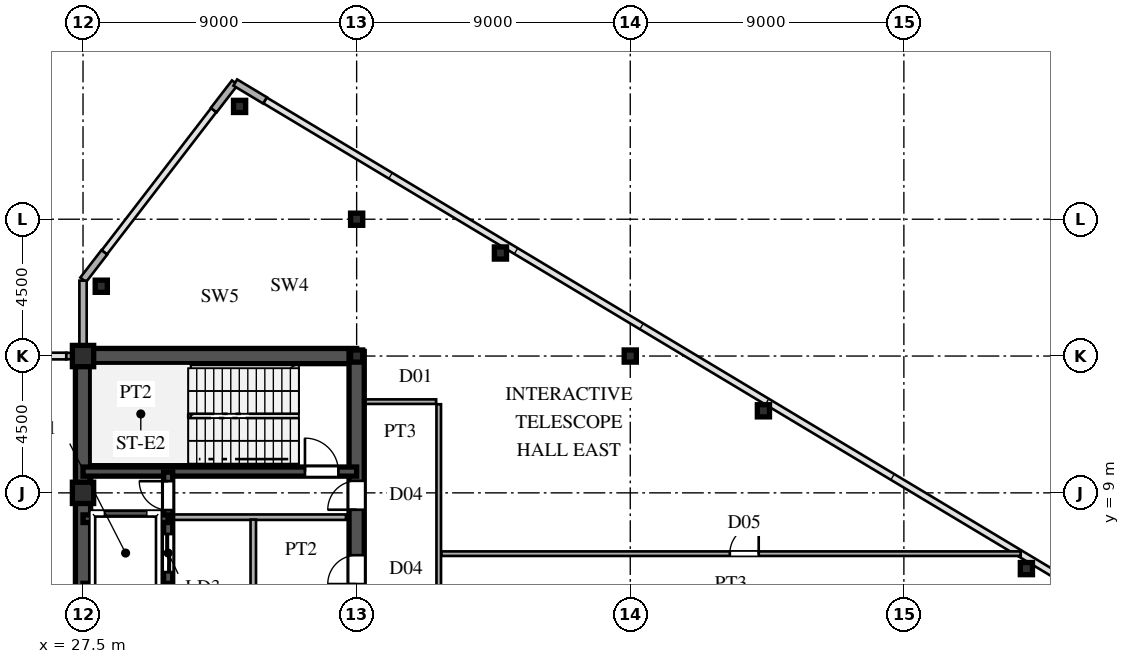
"""IFC4 building model, lengths in metres.
Left out: names, types, materials, properties, quantities, classifications, styles, units other than length and angle.
Written with IfcOpenShell. Run it as: python <this file> out.ifc"""

import sys

from ifc_helpers import new_model, si_unit, direction, frame, frame_2d, origin, origin_2d, place, context, subcontext, project, spatial, rectangle, hollow_rectangle, i_section, extrude, source, transform, mapped, element, fill, save


model = new_model("IFC4")
c1 = context("Model", 3, precision=1e-05, world=origin(), true_north=direction((0.0, 1.0)))
c2 = subcontext(c1, "Body", "Model", "MODEL_VIEW")
j1 = project(units=[si_unit("LENGTHUNIT", "METRE"), si_unit("PLANEANGLEUNIT", "RADIAN")], contexts=[c1])
p1 = place(None, origin())
s1 = spatial("IfcSite", under=j1, at=p1, CompositionType="ELEMENT")
p2 = place(p1, origin())
s2 = spatial("IfcBuilding", under=s1, at=p2, CompositionType="ELEMENT")
p3 = place(p2, frame((0.0, 0.0, 269.4)))
s3 = spatial("IfcBuildingStorey", under=s2, at=p3, CompositionType="ELEMENT", Elevation=269.4)
m1 = source(origin(), c2, "Body", "SweptSolid", [
    extrude(hollow_rectangle(XDim=0.7, YDim=0.7, WallThickness=0.03, at=origin_2d()), origin(), (0.0, 0.0, 1.0), 4.8),
])
for number, where, z_axis, x_axis in (
    (1, (27.5, 9.0, 0.0), (0.0, 0.0, 1.0), (1.0, 0.0, 0.0)),
    (2, (27.5, 13.5, 0.0), (0.0, 0.0, 1.0), (1.0, 0.0, 0.0)),
):
    element("IfcColumn", number, at=place(p3, frame(where, z_axis=z_axis, x_axis=x_axis)), inside=s3, PredefinedType="COLUMN", context=c2, shape_type="MappedRepresentation", body=[
        mapped(m1, transform((0.0, 0.0, 0.0), scale=1.0)),
    ])
m2 = source(origin(), c2, "Body", "SweptSolid", [
    extrude(i_section(OverallWidth=0.4, OverallDepth=0.4, WebThickness=0.013, FlangeThickness=0.021, at=origin_2d()), origin(), (0.0, 0.0, 1.0), 4.8),
])
for number, where, z_axis, x_axis in (
    (3, (36.5, 13.5, 0.0), (0.0, 0.0, 1.0), (1.0, 0.0, 0.0)),
    (4, (36.5, 18.0, 0.0), (0.0, 0.0, 1.0), (1.0, 0.0, 0.0)),
    (5, (45.5, 13.5, 0.0), (0.0, 0.0, 1.0), (1.0, 0.0, 0.0)),
):
    element("IfcColumn", number, at=place(p3, frame(where, z_axis=z_axis, x_axis=x_axis)), inside=s3, PredefinedType="COLUMN", context=c2, shape_type="MappedRepresentation", body=[
        mapped(m2, transform((0.0, 0.0, 0.0), scale=1.0)),
    ])
m3 = source(origin(), c2, "Body", "SweptSolid", [
    extrude(hollow_rectangle(XDim=0.4, YDim=0.4, WallThickness=0.016, at=origin_2d()), origin(), (0.0, 0.0, 1.0), 4.8),
])
for number, where, z_axis, x_axis in (
    (6, (32.65, 21.71, 0.0), (0.0, 0.0, 1.0), (1.0, 0.0, 0.0)),
    (7, (28.1, 15.796, 0.0), (0.0, 0.0, 1.0), (1.0, 0.0, 0.0)),
    (8, (41.23, 16.889, 0.0), (0.0, 0.0, 1.0), (1.0, 0.0, 0.0)),
    (9, (49.88, 11.699, 0.0), (0.0, 0.0, 1.0), (1.0, 0.0, 0.0)),
    (10, (58.53, 6.509, 0.0), (0.0, 0.0, 1.0), (1.0, 0.0, 0.0)),
):
    element("IfcColumn", number, at=place(p3, frame(where, z_axis=z_axis, x_axis=x_axis)), inside=s3, PredefinedType="COLUMN", context=c2, shape_type="MappedRepresentation", body=[
        mapped(m3, transform((0.0, 0.0, 0.0), scale=1.0)),
    ])
for number, where, z_axis, x_axis in (
    (11, (33.486, 21.908, 0.0), (0.0, 0.0, 1.0), (-0.857, 0.515, 0.0)),
    (12, (32.494, 22.492, 0.0), (0.0, 0.0, 1.0), (-0.61, -0.793, 0.0)),
    (13, (28.201, 16.912, 0.0), (0.0, 0.0, 1.0), (-0.61, -0.793, 0.0)),
):
    element("IfcWall", number, at=place(p3, frame(where, z_axis=z_axis, x_axis=x_axis)), inside=s3, PredefinedType="SOLIDWALL", context=c2, shape_type="SweptSolid", body=[
        extrude(rectangle(XDim=1.14, YDim=0.24, at=frame_2d((0.57, 0.0))), origin(), (0.0, 0.0, 1.0), 4.54),
    ])
p4 = place(p3, frame((27.5, 13.755, 0.0), z_axis=(0.0, 0.0, 1.0), x_axis=(0.0, 1.0, 0.0)))
e14 = element("IfcWall", 14, at=p4, inside=s3, PredefinedType="SOLIDWALL", context=c2, shape_type="SweptSolid", body=[
    extrude(rectangle(XDim=0.62, YDim=0.24, at=frame_2d((0.31, 0.0))), origin(), (0.0, 0.0, 1.0), 4.04),
])
p5 = place(p3, frame((27.5, 14.375, 0.0), z_axis=(0.0, 0.0, 1.0), x_axis=(0.0, 1.0, 0.0)))
e15 = element("IfcWall", 15, at=p5, inside=s3, PredefinedType="SOLIDWALL", context=c2, shape_type="SweptSolid", body=[
    extrude(rectangle(XDim=1.605, YDim=0.24, at=frame_2d((0.803, 0.0))), origin(), (0.0, 0.0, 1.0), 4.54),
])
p6 = place(p3, frame((26.95, 13.5, 0.0), z_axis=(0.0, 0.0, 1.0), x_axis=(1.0, 0.0, 0.0)))
e16 = element("IfcWall", 16, at=p6, inside=s3, PredefinedType="SOLIDWALL", context=c2, shape_type="SweptSolid", body=[
    extrude(rectangle(XDim=0.54, YDim=0.21, at=frame_2d((0.27, 0.0))), origin(), (0.0, 0.0, 1.0), 4.04),
])
p7 = place(p3, frame((27.5, 1.3, 0.0), z_axis=(0.0, 0.0, 1.0), x_axis=(0.0, 1.0, 0.0)))
e17 = element("IfcWall", 17, at=p7, inside=s3, PredefinedType="SHEAR", context=c2, shape_type="SweptSolid", body=[
    extrude(rectangle(XDim=12.2, YDim=0.5, at=frame_2d((6.1, 0.0))), origin(), (0.0, 0.0, 1.0), 4.54),
])
p8 = place(p3, frame((27.5, 13.5, 0.0), z_axis=(0.0, 0.0, 1.0), x_axis=(1.0, 0.0, 0.0)))
e18 = element("IfcWall", 18, at=p8, inside=s3, PredefinedType="SHEAR", context=c2, shape_type="SweptSolid", body=[
    extrude(rectangle(XDim=9.0, YDim=0.5, at=frame_2d((4.5, 0.0))), origin(), (0.0, 0.0, 1.0), 4.54),
])
p9 = place(p3, frame((36.5, 8.2, 0.0), z_axis=(0.0, 0.0, 1.0), x_axis=(0.0, 1.0, 0.0)))
e19 = element("IfcWall", 19, at=p9, inside=s3, PredefinedType="SHEAR", context=c2, shape_type="SweptSolid", body=[
    extrude(rectangle(XDim=5.45, YDim=0.5, at=frame_2d((2.725, 0.0))), origin(), (0.0, 0.0, 1.0), 4.54),
])
p10 = place(p9, frame((0.245, 0.0, 0.0)))
e20 = element("IfcOpeningElement", 20, at=p10, cuts=e19, PredefinedType="OPENING", context=c2, shape_type="SweptSolid", body=[
    extrude(rectangle(XDim=0.95, YDim=2.15, at=frame_2d((0.475, 1.075))), frame((0.0, 0.26, 0.0), z_axis=(0.0, -1.0, 0.0), x_axis=(1.0, 0.0, 0.0)), (0.0, 0.0, 1.0), 0.52),
])
p11 = place(p3, frame((36.5, 4.75, 0.0), z_axis=(0.0, 0.0, 1.0), x_axis=(0.0, 1.0, 0.0)))
e21 = element("IfcWall", 21, at=p11, inside=s3, PredefinedType="SHEAR", context=c2, shape_type="SweptSolid", body=[
    extrude(rectangle(XDim=3.45, YDim=0.5, at=frame_2d((1.725, 0.0))), origin(), (0.0, 0.0, 1.0), 4.54),
])
p12 = place(p11, frame((1.25, 0.0, 0.0)))
e22 = element("IfcOpeningElement", 22, at=p12, cuts=e21, PredefinedType="OPENING", context=c2, shape_type="SweptSolid", body=[
    extrude(rectangle(XDim=0.95, YDim=2.15, at=frame_2d((0.475, 1.075))), frame((0.0, 0.26, 0.0), z_axis=(0.0, -1.0, 0.0), x_axis=(1.0, 0.0, 0.0)), (0.0, 0.0, 1.0), 0.52),
])
p13 = place(p3, frame((27.5, 9.7, 0.0), z_axis=(0.0, 0.0, 1.0), x_axis=(1.0, 0.0, 0.0)))
e23 = element("IfcWall", 23, at=p13, inside=s3, PredefinedType="SHEAR", context=c2, shape_type="SweptSolid", body=[
    extrude(rectangle(XDim=9.0, YDim=0.3, at=frame_2d((4.5, 0.0))), origin(), (0.0, 0.0, 1.0), 4.54),
])
p14 = place(p13, frame((7.3, 0.0, 0.0)))
e24 = element("IfcOpeningElement", 24, at=p14, cuts=e23, PredefinedType="OPENING", context=c2, shape_type="SweptSolid", body=[
    extrude(rectangle(XDim=1.1, YDim=2.2, at=frame_2d((0.55, 1.1))), frame((0.0, 0.16, 0.0), z_axis=(0.0, -1.0, 0.0), x_axis=(1.0, 0.0, 0.0)), (0.0, 0.0, 1.0), 0.32),
])
for number, where, z_axis, x_axis in (
    (25, (27.5, 5.9, 0.0), (0.0, 0.0, 1.0), (1.0, 0.0, 0.0)),
    (26, (27.5, 8.15, 0.0), (0.0, 0.0, 1.0), (1.0, 0.0, 0.0)),
):
    element("IfcWall", number, at=place(p3, frame(where, z_axis=z_axis, x_axis=x_axis)), inside=s3, PredefinedType="SHEAR", context=c2, shape_type="SweptSolid", body=[
        extrude(rectangle(XDim=2.8, YDim=0.25, at=frame_2d((1.4, 0.0))), origin(), (0.0, 0.0, 1.0), 4.54),
    ])
p15 = place(p3, frame((30.3, 5.9, 0.0), z_axis=(0.0, 0.0, 1.0), x_axis=(0.0, 1.0, 0.0)))
e27 = element("IfcWall", 27, at=p15, inside=s3, PredefinedType="SHEAR", context=c2, shape_type="SweptSolid", body=[
    extrude(rectangle(XDim=2.25, YDim=0.3, at=frame_2d((1.125, 0.0))), origin(), (0.0, 0.0, 1.0), 4.54),
])
p16 = place(p15, frame((0.495, 0.0, 0.0)))
e28 = element("IfcOpeningElement", 28, at=p16, cuts=e27, PredefinedType="OPENING", context=c2, shape_type="SweptSolid", body=[
    extrude(rectangle(XDim=1.25, YDim=2.3, at=frame_2d((0.625, 1.15))), frame((0.0, 0.16, 0.0), z_axis=(0.0, -1.0, 0.0), x_axis=(1.0, 0.0, 0.0)), (0.0, 0.0, 1.0), 0.32),
])
p17 = place(p3, frame((30.3, 8.15, 0.0), z_axis=(0.0, 0.0, 1.0), x_axis=(0.0, 1.0, 0.0)))
e29 = element("IfcWall", 29, at=p17, inside=s3, PredefinedType="SHEAR", context=c2, shape_type="SweptSolid", body=[
    extrude(rectangle(XDim=1.53, YDim=0.3, at=frame_2d((0.765, 0.0))), origin(), (0.0, 0.0, 1.0), 4.54),
])
p18 = place(p17, frame((0.285, 0.0, 0.0)))
e30 = element("IfcOpeningElement", 30, at=p18, cuts=e29, PredefinedType="OPENING", context=c2, shape_type="SweptSolid", body=[
    extrude(rectangle(XDim=0.95, YDim=2.15, at=frame_2d((0.475, 1.075))), frame((0.0, 0.16, 0.0), z_axis=(0.0, -1.0, 0.0), x_axis=(1.0, 0.0, 0.0)), (0.0, 0.0, 1.0), 0.32),
])
p19 = place(p3, frame((30.45, 8.2, 0.0), z_axis=(0.0, 0.0, 1.0), x_axis=(1.0, 0.0, 0.0)))
e31 = element("IfcWall", 31, at=p19, inside=s3, PredefinedType="PARTITIONING", context=c2, shape_type="SweptSolid", body=[
    extrude(rectangle(XDim=5.7, YDim=0.18, at=frame_2d((2.85, 0.0))), origin(), (0.0, 0.0, 1.0), 4.54),
])
p20 = place(p3, frame((33.1, 1.38, 0.0), z_axis=(0.0, 0.0, 1.0), x_axis=(0.0, 1.0, 0.0)))
e32 = element("IfcWall", 32, at=p20, inside=s3, PredefinedType="PARTITIONING", context=c2, shape_type="SweptSolid", body=[
    extrude(rectangle(XDim=6.74, YDim=0.18, at=frame_2d((3.37, 0.0))), origin(), (0.0, 0.0, 1.0), 4.54),
])
p21 = place(p3, frame((39.285, 7.0, 0.0), z_axis=(0.0, 0.0, 1.0), x_axis=(1.0, 0.0, 0.0)))
e33 = element("IfcWall", 33, at=p21, inside=s3, PredefinedType="PARTITIONING", context=c2, shape_type="SweptSolid", body=[
    extrude(rectangle(XDim=19.058, YDim=0.15, at=frame_2d((9.529, 0.0))), origin(), (0.0, 0.0, 1.0), 4.54),
])
p22 = place(p21, frame((9.49, 0.0, 0.0)))
e34 = element("IfcOpeningElement", 34, at=p22, cuts=e33, PredefinedType="OPENING", context=c2, shape_type="SweptSolid", body=[
    extrude(rectangle(XDim=0.95, YDim=2.15, at=frame_2d((0.475, 1.075))), frame((0.0, 0.085, 0.0), z_axis=(0.0, -1.0, 0.0), x_axis=(1.0, 0.0, 0.0)), (0.0, 0.0, 1.0), 0.17),
])
p23 = place(p3, frame((36.755, 12.0, 0.0), z_axis=(0.0, 0.0, 1.0), x_axis=(1.0, 0.0, 0.0)))
e35 = element("IfcWall", 35, at=p23, inside=s3, PredefinedType="PARTITIONING", context=c2, shape_type="SweptSolid", body=[
    extrude(rectangle(XDim=2.36, YDim=0.15, at=frame_2d((1.18, 0.0))), origin(), (0.0, 0.0, 1.0), 4.54),
])
p24 = place(p3, frame((39.2, -11.915, 0.0), z_axis=(0.0, 0.0, 1.0), x_axis=(0.0, 1.0, 0.0)))
e36 = element("IfcWall", 36, at=p24, inside=s3, PredefinedType="PARTITIONING", context=c2, shape_type="SweptSolid", body=[
    extrude(rectangle(XDim=23.83, YDim=0.15, at=frame_2d((11.915, 0.0))), origin(), (0.0, 0.0, 1.0), 4.54),
])
p25 = place(p24, frame((11.44, 0.0, 0.0)))
e37 = element("IfcOpeningElement", 37, at=p25, cuts=e36, PredefinedType="OPENING", context=c2, shape_type="SweptSolid", body=[
    extrude(rectangle(XDim=0.95, YDim=2.15, at=frame_2d((0.475, 1.075))), frame((0.0, 0.085, 0.0), z_axis=(0.0, -1.0, 0.0), x_axis=(1.0, 0.0, 0.0)), (0.0, 0.0, 1.0), 0.17),
])
m4 = source(origin(), c2, "Body", "SweptSolid", [
    extrude(rectangle(XDim=0.95, YDim=2.15, at=frame_2d((0.475, 1.075))), frame((0.0, 0.025, 0.0), z_axis=(0.0, -1.0, 0.0), x_axis=(1.0, 0.0, 0.0)), (0.0, 0.0, 1.0), 0.05),
])
p26 = place(p10, origin())
e38 = element("IfcDoor", 38, at=p26, inside=s3, OperationType="SINGLE_SWING_LEFT", PredefinedType="DOOR", context=c2, shape_type="MappedRepresentation", body=[
    mapped(m4, transform((0.0, 0.0, 0.0), scale=1.0)),
])
fill(e20, e38)
p27 = place(p12, origin())
e39 = element("IfcDoor", 39, at=p27, inside=s3, OperationType="SINGLE_SWING_LEFT", PredefinedType="DOOR", context=c2, shape_type="MappedRepresentation", body=[
    mapped(m4, transform((0.0, 0.0, 0.0), scale=1.0)),
])
fill(e22, e39)
m5 = source(origin(), c2, "Body", "SweptSolid", [
    extrude(rectangle(XDim=1.1, YDim=2.2, at=frame_2d((0.55, 1.1))), frame((0.0, 0.025, 0.0), z_axis=(0.0, -1.0, 0.0), x_axis=(1.0, 0.0, 0.0)), (0.0, 0.0, 1.0), 0.05),
])
p28 = place(p14, origin())
e40 = element("IfcDoor", 40, at=p28, inside=s3, OperationType="SINGLE_SWING_LEFT", PredefinedType="DOOR", context=c2, shape_type="MappedRepresentation", body=[
    mapped(m5, transform((0.0, 0.0, 0.0), scale=1.0)),
])
fill(e24, e40)
m6 = source(origin(), c2, "Body", "SweptSolid", [
    extrude(rectangle(XDim=1.25, YDim=2.3, at=frame_2d((0.625, 1.15))), frame((0.0, 0.025, 0.0), z_axis=(0.0, -1.0, 0.0), x_axis=(1.0, 0.0, 0.0)), (0.0, 0.0, 1.0), 0.05),
])
p29 = place(p16, origin())
e41 = element("IfcDoor", 41, at=p29, inside=s3, OperationType="DOUBLE_DOOR_SLIDING", PredefinedType="DOOR", context=c2, shape_type="MappedRepresentation", body=[
    mapped(m6, transform((0.0, 0.0, 0.0), scale=1.0)),
])
fill(e28, e41)
p30 = place(p18, origin())
e42 = element("IfcDoor", 42, at=p30, inside=s3, OperationType="SINGLE_SWING_RIGHT", PredefinedType="DOOR", context=c2, shape_type="MappedRepresentation", body=[
    mapped(m4, transform((0.0, 0.0, 0.0), scale=1.0)),
])
fill(e30, e42)
m7 = source(origin(), c2, "Body", "SweptSolid", [
    extrude(rectangle(XDim=0.95, YDim=2.15, at=frame_2d((0.475, 1.075))), frame((0.0, 0.025, 0.0), z_axis=(0.0, -1.0, 0.0), x_axis=(1.0, 0.0, 0.0)), (0.0, 0.0, 1.0), 0.05),
])
p31 = place(p22, origin())
e43 = element("IfcDoor", 43, at=p31, inside=s3, OperationType="SINGLE_SWING_RIGHT", PredefinedType="DOOR", context=c2, shape_type="MappedRepresentation", body=[
    mapped(m7, transform((0.0, 0.0, 0.0), scale=1.0)),
])
fill(e34, e43)
save(model, sys.argv[1])
